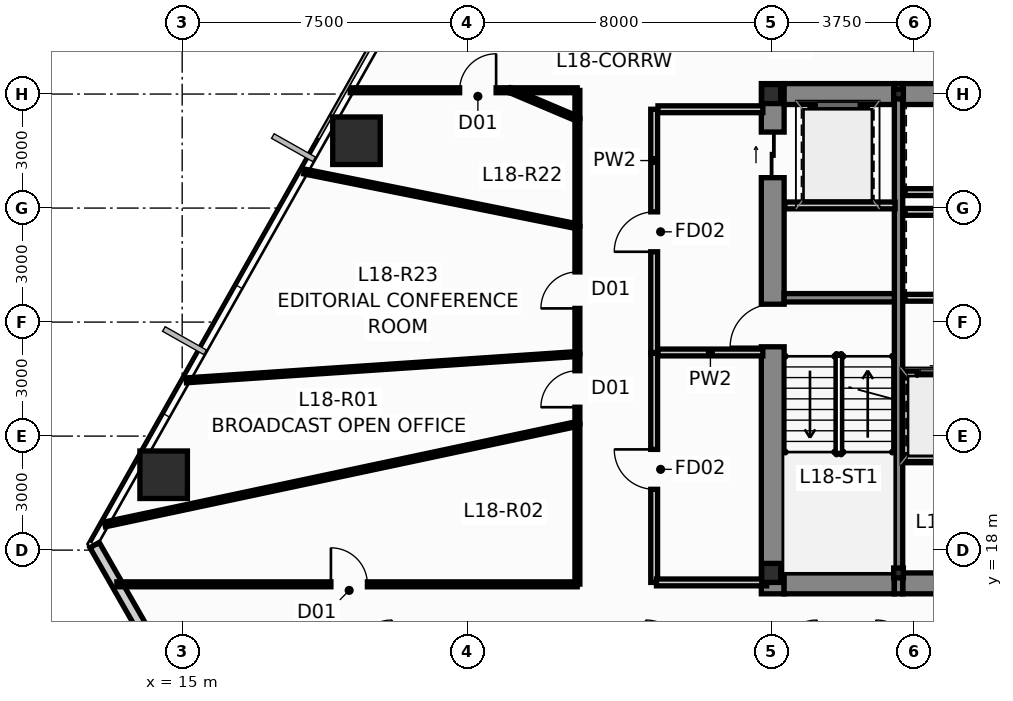
"""IFC4 building model, lengths in metres.
Left out: names, types, materials, properties, quantities, classifications, styles, units other than length and angle.
Written with IfcOpenShell. Run it as: python <this file> out.ifc"""

import sys

from ifc_helpers import new_model, si_unit, direction, frame, frame_2d, origin, origin_2d, place, context, subcontext, project, spatial, rectangle, hollow_rectangle, i_section, extrude, source, transform, mapped, element, fill, save


model = new_model("IFC4")
c1 = context("Model", 3, precision=1e-05, world=origin(), true_north=direction((0.0, 1.0)))
c2 = subcontext(c1, "Body", "Model", "MODEL_VIEW")
j1 = project(units=[si_unit("LENGTHUNIT", "METRE"), si_unit("PLANEANGLEUNIT", "RADIAN")], contexts=[c1])
p1 = place(None, origin())
s1 = spatial("IfcSite", under=j1, at=p1, CompositionType="ELEMENT")
p2 = place(p1, origin())
s2 = spatial("IfcBuilding", under=s1, at=p2, CompositionType="ELEMENT")
p3 = place(p2, frame((0.0, 0.0, 71.4)))
s3 = spatial("IfcBuildingStorey", under=s2, at=p3, CompositionType="ELEMENT", Elevation=71.4)
m1 = source(origin(), c2, "Body", "SweptSolid", [
    extrude(i_section(OverallWidth=0.5, OverallDepth=0.5, WebThickness=0.028, FlangeThickness=0.04, at=origin_2d()), origin(), (0.0, 0.0, 1.0), 3.65),
])
for number, where, z_axis, x_axis in (
    (1, (30.5, 17.4, 0.0), (0.0, 0.0, 1.0), (1.0, 0.0, 0.0)),
    (2, (30.5, 30.0, 0.0), (0.0, 0.0, 1.0), (1.0, 0.0, 0.0)),
):
    element("IfcColumn", number, at=place(p3, frame(where, z_axis=z_axis, x_axis=x_axis)), inside=s3, PredefinedType="COLUMN", context=c2, shape_type="MappedRepresentation", body=[
        mapped(m1, transform((0.0, 0.0, 0.0), scale=1.0)),
    ])
m2 = source(origin(), c2, "Body", "SweptSolid", [
    extrude(i_section(OverallWidth=0.256, OverallDepth=0.26, WebThickness=0.01, FlangeThickness=0.017, at=origin_2d()), origin(), (0.0, 0.0, 1.0), 3.65),
])
for number, where, z_axis, x_axis in (
    (3, (33.85, 17.4, 0.0), (0.0, 0.0, 1.0), (1.0, 0.0, 0.0)),
    (4, (33.85, 30.0, 0.0), (0.0, 0.0, 1.0), (1.0, 0.0, 0.0)),
):
    element("IfcColumn", number, at=place(p3, frame(where, z_axis=z_axis, x_axis=x_axis)), inside=s3, PredefinedType="COLUMN", context=c2, shape_type="MappedRepresentation", body=[
        mapped(m2, transform((0.0, 0.0, 0.0), scale=1.0)),
    ])
p4 = place(p3, frame((30.54, 16.85, 0.0), z_axis=(0.0, 0.0, 1.0), x_axis=(0.0, 1.0, 0.0)))
e5 = element("IfcWall", 5, at=p4, inside=s3, PredefinedType="SHEAR", context=c2, shape_type="SweptSolid", body=[
    extrude(rectangle(XDim=13.425, YDim=0.6, at=frame_2d((6.712, 0.0))), origin(), (0.0, 0.0, 1.0), 3.65),
])
p5 = place(p4, frame((6.5, 0.0, 0.0)))
e6 = element("IfcOpeningElement", 6, at=p5, cuts=e5, PredefinedType="OPENING", context=c2, shape_type="SweptSolid", body=[
    extrude(rectangle(XDim=1.12, YDim=2.15, at=frame_2d((0.56, 1.075))), frame((0.0, 0.312, 0.0), z_axis=(0.0, -1.0, 0.0), x_axis=(1.0, 0.0, 0.0)), (0.0, 0.0, 1.0), 0.624),
])
p6 = place(p4, frame((10.95, 0.0, 0.0)))
e7 = element("IfcOpeningElement", 7, at=p6, cuts=e5, PredefinedType="OPENING", context=c2, shape_type="SweptSolid", body=[
    extrude(rectangle(XDim=1.2, YDim=2.2, at=frame_2d((0.6, 1.1))), frame((0.0, 0.312, 0.0), z_axis=(0.0, -1.0, 0.0), x_axis=(1.0, 0.0, 0.0)), (0.0, 0.0, 1.0), 0.624),
])
p7 = place(p3, frame((30.84, 17.125, 0.0), z_axis=(0.0, 0.0, 1.0), x_axis=(1.0, 0.0, 0.0)))
e8 = element("IfcWall", 8, at=p7, inside=s3, PredefinedType="SHEAR", context=c2, shape_type="SweptSolid", body=[
    extrude(rectangle(XDim=2.9, YDim=0.55, at=frame_2d((1.45, 0.0))), origin(), (0.0, 0.0, 1.0), 3.65),
])
p8 = place(p3, frame((33.96, 17.125, 0.0), z_axis=(0.0, 0.0, 1.0), x_axis=(1.0, 0.0, 0.0)))
e9 = element("IfcWall", 9, at=p8, inside=s3, PredefinedType="SHEAR", context=c2, shape_type="SweptSolid", body=[
    extrude(rectangle(XDim=8.08, YDim=0.55, at=frame_2d((4.04, 0.0))), origin(), (0.0, 0.0, 1.0), 3.65),
])
p9 = place(p3, frame((30.84, 30.0, 0.0), z_axis=(0.0, 0.0, 1.0), x_axis=(1.0, 0.0, 0.0)))
e10 = element("IfcWall", 10, at=p9, inside=s3, PredefinedType="SHEAR", context=c2, shape_type="SweptSolid", body=[
    extrude(rectangle(XDim=2.9, YDim=0.55, at=frame_2d((1.45, 0.0))), origin(), (0.0, 0.0, 1.0), 3.65),
])
p10 = place(p3, frame((33.96, 30.0, 0.0), z_axis=(0.0, 0.0, 1.0), x_axis=(1.0, 0.0, 0.0)))
e11 = element("IfcWall", 11, at=p10, inside=s3, PredefinedType="SHEAR", context=c2, shape_type="SweptSolid", body=[
    extrude(rectangle(XDim=3.78, YDim=0.55, at=frame_2d((1.89, 0.0))), origin(), (0.0, 0.0, 1.0), 3.65),
])
p11 = place(p3, frame((33.85, 16.85, 0.0), z_axis=(0.0, 0.0, 1.0), x_axis=(0.0, 1.0, 0.0)))
e12 = element("IfcWall", 12, at=p11, inside=s3, PredefinedType="SHEAR", context=c2, shape_type="SweptSolid", body=[
    extrude(rectangle(XDim=13.425, YDim=0.22, at=frame_2d((6.712, 0.0))), origin(), (0.0, 0.0, 1.0), 3.65),
])
p12 = place(p3, frame((30.84, 24.64, 0.0), z_axis=(0.0, 0.0, 1.0), x_axis=(1.0, 0.0, 0.0)))
e13 = element("IfcWall", 13, at=p12, inside=s3, PredefinedType="SHEAR", context=c2, shape_type="SweptSolid", body=[
    extrude(rectangle(XDim=2.9, YDim=0.22, at=frame_2d((1.45, 0.0))), origin(), (0.0, 0.0, 1.0), 3.65),
])
m3 = source(origin(), c2, "Body", "SweptSolid", [
    extrude(hollow_rectangle(XDim=1.25, YDim=1.25, WallThickness=0.07, at=origin_2d()), origin(), (0.0, 0.0, 1.0), 3.651),
])
p13 = place(p3, frame((19.587, 28.772, 0.0), z_axis=(0.014912316331, -0.013775502979, 0.999793907933), x_axis=(0.678553674548, 0.734550822447, 0.0)))
e14 = element("IfcColumn", 14, at=p13, inside=s3, PredefinedType="COLUMN", context=c2, shape_type="MappedRepresentation", body=[
    mapped(m3, transform((0.0, 0.0, 0.0), scale=1.0)),
])
m4 = source(origin(), c2, "Body", "SweptSolid", [
    extrude(hollow_rectangle(XDim=1.25, YDim=1.25, WallThickness=0.07, at=origin_2d()), origin(), (0.0, 0.0, 1.0), 3.651),
])
p14 = place(p3, frame((14.512, 19.983, 0.0), z_axis=(0.010431083049, -0.021597691184, 0.999712324742), x_axis=(0.900476348161, 0.434904985489, 0.0)))
e15 = element("IfcColumn", 15, at=p14, inside=s3, PredefinedType="COLUMN", context=c2, shape_type="MappedRepresentation", body=[
    mapped(m4, transform((0.0, 0.0, 0.0), scale=1.0)),
])
p15 = place(p3, frame((20.164, 5.08, 0.0), z_axis=(0.0, 0.0, 1.0), x_axis=(-0.496610912016, 0.867973272668, 0.0)))
e16 = element("IfcWall", 16, at=p15, inside=s3, PredefinedType="STANDARD", context=c2, shape_type="SweptSolid", body=[
    extrude(rectangle(XDim=15.039, YDim=0.28, at=frame_2d((7.519, 0.0))), origin(), (0.0, 0.0, 1.0), 3.25),
])
p16 = place(p15, frame((6.62, 0.0, 0.9)))
e17 = element("IfcOpeningElement", 17, at=p16, cuts=e16, PredefinedType="OPENING", context=c2, shape_type="SweptSolid", body=[
    extrude(rectangle(XDim=1.8, YDim=1.8, at=frame_2d((0.9, 0.9))), frame((0.0, 0.152, 0.0), z_axis=(0.0, -1.0, 0.0), x_axis=(1.0, 0.0, 0.0)), (0.0, 0.0, 1.0), 0.304),
])
p17 = place(p3, frame((34.02, 22.62, 0.0), z_axis=(0.0, 0.0, 1.0), x_axis=(1.0, 0.0, 0.0)))
e18 = element("IfcWall", 18, at=p17, inside=s3, PredefinedType="PARTITIONING", context=c2, shape_type="SweptSolid", body=[
    extrude(rectangle(XDim=3.6, YDim=0.18, at=frame_2d((1.8, 0.0))), origin(), (0.0, 0.0, 1.0), 3.25),
])
p18 = place(p17, frame((0.32, 0.0, 0.0)))
e19 = element("IfcOpeningElement", 19, at=p18, cuts=e18, PredefinedType="OPENING", context=c2, shape_type="SweptSolid", body=[
    extrude(rectangle(XDim=1.1, YDim=2.2, at=frame_2d((0.55, 1.1))), frame((0.0, 0.102, 0.0), z_axis=(0.0, -1.0, 0.0), x_axis=(1.0, 0.0, 0.0)), (0.0, 0.0, 1.0), 0.204),
])
p19 = place(p17, frame((2.12, 0.0, 0.0)))
e20 = element("IfcOpeningElement", 20, at=p19, cuts=e18, PredefinedType="OPENING", context=c2, shape_type="SweptSolid", body=[
    extrude(rectangle(XDim=1.1, YDim=2.2, at=frame_2d((0.55, 1.1))), frame((0.0, 0.102, 0.0), z_axis=(0.0, -1.0, 0.0), x_axis=(1.0, 0.0, 0.0)), (0.0, 0.0, 1.0), 0.204),
])
p20 = place(p3, frame((34.02, 26.9, 0.0), z_axis=(0.0, 0.0, 1.0), x_axis=(1.0, 0.0, 0.0)))
e21 = element("IfcWall", 21, at=p20, inside=s3, PredefinedType="PARTITIONING", context=c2, shape_type="SweptSolid", body=[
    extrude(rectangle(XDim=3.6, YDim=0.18, at=frame_2d((1.8, 0.0))), origin(), (0.0, 0.0, 1.0), 3.25),
])
p21 = place(p3, frame((34.02, 24.64, 0.0), z_axis=(0.0, 0.0, 1.0), x_axis=(1.0, 0.0, 0.0)))
e22 = element("IfcWall", 22, at=p21, inside=s3, PredefinedType="PARTITIONING", context=c2, shape_type="SweptSolid", body=[
    extrude(rectangle(XDim=3.68, YDim=0.18, at=frame_2d((1.84, 0.0))), origin(), (0.0, 0.0, 1.0), 3.25),
])
p22 = place(p3, frame((34.02, 27.42, 0.0), z_axis=(0.0, 0.0, 1.0), x_axis=(1.0, 0.0, 0.0)))
e23 = element("IfcWall", 23, at=p22, inside=s3, PredefinedType="PARTITIONING", context=c2, shape_type="SweptSolid", body=[
    extrude(rectangle(XDim=3.66, YDim=0.18, at=frame_2d((1.83, 0.0))), origin(), (0.0, 0.0, 1.0), 3.25),
])
p23 = place(p3, frame((27.42, 23.2, 0.0), z_axis=(0.0, 0.0, 1.0), x_axis=(0.0, 1.0, 0.0)))
e24 = element("IfcWall", 24, at=p23, inside=s3, PredefinedType="PARTITIONING", context=c2, shape_type="SweptSolid", body=[
    extrude(rectangle(XDim=6.4, YDim=0.18, at=frame_2d((3.2, 0.0))), origin(), (0.0, 0.0, 1.0), 3.25),
])
p24 = place(p23, frame((2.65, 0.0, 0.0)))
e25 = element("IfcOpeningElement", 25, at=p24, cuts=e24, PredefinedType="OPENING", context=c2, shape_type="SweptSolid", body=[
    extrude(rectangle(XDim=1.05, YDim=2.15, at=frame_2d((0.525, 1.075))), frame((0.0, 0.102, 0.0), z_axis=(0.0, -1.0, 0.0), x_axis=(1.0, 0.0, 0.0)), (0.0, 0.0, 1.0), 0.204),
])
p25 = place(p3, frame((27.52, 23.2, 0.0), z_axis=(0.0, 0.0, 1.0), x_axis=(1.0, 0.0, 0.0)))
e26 = element("IfcWall", 26, at=p25, inside=s3, PredefinedType="PARTITIONING", context=c2, shape_type="SweptSolid", body=[
    extrude(rectangle(XDim=2.76, YDim=0.18, at=frame_2d((1.38, 0.0))), origin(), (0.0, 0.0, 1.0), 3.25),
])
p26 = place(p3, frame((27.52, 29.6, 0.0), z_axis=(0.0, 0.0, 1.0), x_axis=(1.0, 0.0, 0.0)))
e27 = element("IfcWall", 27, at=p26, inside=s3, PredefinedType="PARTITIONING", context=c2, shape_type="SweptSolid", body=[
    extrude(rectangle(XDim=2.76, YDim=0.18, at=frame_2d((1.38, 0.0))), origin(), (0.0, 0.0, 1.0), 2.633),
])
p27 = place(p3, frame((30.86, 27.07, 0.0), z_axis=(0.0, 0.0, 1.0), x_axis=(1.0, 0.0, 0.0)))
e28 = element("IfcWall", 28, at=p27, inside=s3, PredefinedType="PARTITIONING", context=c2, shape_type="SweptSolid", body=[
    extrude(rectangle(XDim=2.9, YDim=0.18, at=frame_2d((1.45, 0.0))), origin(), (0.0, 0.0, 1.0), 3.25),
])
p28 = place(p3, frame((34.02, 20.42, 0.0), z_axis=(0.0, 0.0, 1.0), x_axis=(1.0, 0.0, 0.0)))
e29 = element("IfcWall", 29, at=p28, inside=s3, PredefinedType="PARTITIONING", context=c2, shape_type="SweptSolid", body=[
    extrude(rectangle(XDim=3.64, YDim=0.18, at=frame_2d((1.82, 0.0))), origin(), (0.0, 0.0, 1.0), 3.25),
])
p29 = place(p3, frame((27.42, 17.15, 0.0), z_axis=(0.0, 0.0, 1.0), x_axis=(0.0, 1.0, 0.0)))
e30 = element("IfcWall", 30, at=p29, inside=s3, PredefinedType="PARTITIONING", context=c2, shape_type="SweptSolid", body=[
    extrude(rectangle(XDim=6.03, YDim=0.18, at=frame_2d((3.015, 0.0))), origin(), (0.0, 0.0, 1.0), 2.876),
])
p30 = place(p29, frame((2.45, 0.0, 0.0)))
e31 = element("IfcOpeningElement", 31, at=p30, cuts=e30, PredefinedType="OPENING", context=c2, shape_type="SweptSolid", body=[
    extrude(rectangle(XDim=1.05, YDim=2.15, at=frame_2d((0.525, 1.075))), frame((0.0, 0.102, 0.0), z_axis=(0.0, -1.0, 0.0), x_axis=(1.0, 0.0, 0.0)), (0.0, 0.0, 1.0), 0.204),
])
p31 = place(p3, frame((27.48, 17.15, 0.0), z_axis=(0.0, 0.0, 1.0), x_axis=(1.0, 0.0, 0.0)))
e32 = element("IfcWall", 32, at=p31, inside=s3, PredefinedType="PARTITIONING", context=c2, shape_type="SweptSolid", body=[
    extrude(rectangle(XDim=2.9, YDim=0.18, at=frame_2d((1.45, 0.0))), origin(), (0.0, 0.0, 1.0), 2.633),
])
p32 = place(p3, frame((12.967, 18.677, 0.0), z_axis=(0.0, 0.0, 1.0), x_axis=(0.978139703206, 0.207948842293, 0.0)))
e33 = element("IfcWall", 33, at=p32, inside=s3, PredefinedType="PARTITIONING", context=c2, shape_type="SweptSolid", body=[
    extrude(rectangle(XDim=12.706, YDim=0.13, at=frame_2d((6.353, 0.0))), origin(), (0.0, 0.0, 1.0), 2.633),
])
p33 = place(p3, frame((13.281, 17.1, 0.0), z_axis=(0.0, 0.0, 1.0), x_axis=(1.0, 0.0, 0.0)))
e34 = element("IfcWall", 34, at=p33, inside=s3, PredefinedType="PARTITIONING", context=c2, shape_type="SweptSolid", body=[
    extrude(rectangle(XDim=12.114, YDim=0.13, at=frame_2d((6.057, 0.0))), origin(), (0.0, 0.0, 1.0), 3.25),
])
p34 = place(p33, frame((5.633, 0.0, 0.0)))
e35 = element("IfcOpeningElement", 35, at=p34, cuts=e34, PredefinedType="OPENING", context=c2, shape_type="SweptSolid", body=[
    extrude(rectangle(XDim=0.96, YDim=2.15, at=frame_2d((0.48, 1.075))), frame((0.0, 0.077, 0.0), z_axis=(0.0, -1.0, 0.0), x_axis=(1.0, 0.0, 0.0)), (0.0, 0.0, 1.0), 0.154),
])
p35 = place(p3, frame((15.109, 22.467, 0.0), z_axis=(0.0, 0.0, 1.0), x_axis=(0.997740719381, 0.067182266178, 0.0)))
e36 = element("IfcWall", 36, at=p35, inside=s3, PredefinedType="PARTITIONING", context=c2, shape_type="SweptSolid", body=[
    extrude(rectangle(XDim=10.31, YDim=0.13, at=frame_2d((5.155, 0.0))), origin(), (0.0, 0.0, 1.0), 3.25),
])
p36 = place(p3, frame((18.213, 27.961, 0.0), z_axis=(0.0, 0.0, 1.0), x_axis=(0.980475419992, -0.196641681214, 0.0)))
e37 = element("IfcWall", 37, at=p36, inside=s3, PredefinedType="PARTITIONING", context=c2, shape_type="SweptSolid", body=[
    extrude(rectangle(XDim=7.325, YDim=0.13, at=frame_2d((3.663, 0.0))), origin(), (0.0, 0.0, 1.0), 3.25),
])
p37 = place(p3, frame((19.421, 30.1, 0.0), z_axis=(0.0, 0.0, 1.0), x_axis=(1.0, 0.0, 0.0)))
e38 = element("IfcWall", 38, at=p37, inside=s3, PredefinedType="PARTITIONING", context=c2, shape_type="SweptSolid", body=[
    extrude(rectangle(XDim=4.204, YDim=0.13, at=frame_2d((2.102, 0.0))), origin(), (0.0, 0.0, 1.0), 3.25),
])
p38 = place(p37, frame((2.88, 0.0, 0.0)))
e39 = element("IfcOpeningElement", 39, at=p38, cuts=e38, PredefinedType="OPENING", context=c2, shape_type="SweptSolid", body=[
    extrude(rectangle(XDim=0.96, YDim=2.15, at=frame_2d((0.48, 1.075))), frame((0.0, 0.077, 0.0), z_axis=(0.0, -1.0, 0.0), x_axis=(1.0, 0.0, 0.0)), (0.0, 0.0, 1.0), 0.154),
])
p39 = place(p3, frame((25.4, 17.105, 0.0), z_axis=(0.0, 0.0, 1.0), x_axis=(0.0, 1.0, 0.0)))
e40 = element("IfcWall", 40, at=p39, inside=s3, PredefinedType="PARTITIONING", context=c2, shape_type="SweptSolid", body=[
    extrude(rectangle(XDim=4.21, YDim=0.13, at=frame_2d((2.105, 0.0))), origin(), (0.0, 0.0, 1.0), 2.876),
])
p40 = place(p3, frame((25.4, 23.165, 0.0), z_axis=(0.0, 0.0, 1.0), x_axis=(0.0, 1.0, 0.0)))
e41 = element("IfcWall", 41, at=p40, inside=s3, PredefinedType="PARTITIONING", context=c2, shape_type="SweptSolid", body=[
    extrude(rectangle(XDim=3.35, YDim=0.13, at=frame_2d((1.675, 0.0))), origin(), (0.0, 0.0, 1.0), 2.876),
])
p41 = place(p40, frame((1.195, 0.0, 0.0)))
e42 = element("IfcOpeningElement", 42, at=p41, cuts=e41, PredefinedType="OPENING", context=c2, shape_type="SweptSolid", body=[
    extrude(rectangle(XDim=0.96, YDim=2.15, at=frame_2d((0.48, 1.075))), frame((0.0, 0.077, 0.0), z_axis=(0.0, -1.0, 0.0), x_axis=(1.0, 0.0, 0.0)), (0.0, 0.0, 1.0), 0.154),
])
p42 = place(p3, frame((25.4, 26.525, 0.0), z_axis=(0.0, 0.0, 1.0), x_axis=(0.0, 1.0, 0.0)))
e43 = element("IfcWall", 43, at=p42, inside=s3, PredefinedType="PARTITIONING", context=c2, shape_type="SweptSolid", body=[
    extrude(rectangle(XDim=2.82, YDim=0.13, at=frame_2d((1.41, 0.0))), origin(), (0.0, 0.0, 1.0), 2.876),
])
p43 = place(p3, frame((23.635, 30.098, 0.0), z_axis=(0.0, 0.0, 1.0), x_axis=(0.920736167048, -0.390185738706, 0.0)))
e44 = element("IfcWall", 44, at=p43, inside=s3, PredefinedType="PARTITIONING", context=c2, shape_type="SweptSolid", body=[
    extrude(rectangle(XDim=1.912, YDim=0.13, at=frame_2d((0.956, 0.0))), origin(), (0.0, 0.0, 1.0), 3.25),
])
p44 = place(p3, frame((25.4, 21.325, 0.0), z_axis=(0.0, 0.0, 1.0), x_axis=(0.0, 1.0, 0.0)))
e45 = element("IfcWall", 45, at=p44, inside=s3, PredefinedType="PARTITIONING", context=c2, shape_type="SweptSolid", body=[
    extrude(rectangle(XDim=1.83, YDim=0.13, at=frame_2d((0.915, 0.0))), origin(), (0.0, 0.0, 1.0), 2.876),
])
p45 = place(p44, frame((0.435, 0.0, 0.0)))
e46 = element("IfcOpeningElement", 46, at=p45, cuts=e45, PredefinedType="OPENING", context=c2, shape_type="SweptSolid", body=[
    extrude(rectangle(XDim=0.96, YDim=2.15, at=frame_2d((0.48, 1.075))), frame((0.0, 0.077, 0.0), z_axis=(0.0, -1.0, 0.0), x_axis=(1.0, 0.0, 0.0)), (0.0, 0.0, 1.0), 0.154),
])
p46 = place(p3, frame((25.395, 30.1, 0.0), z_axis=(0.0, 0.0, 1.0), x_axis=(-1.0, 0.0, 0.0)))
e47 = element("IfcWall", 47, at=p46, inside=s3, PredefinedType="PARTITIONING", context=c2, shape_type="SweptSolid", body=[
    extrude(rectangle(XDim=1.76, YDim=0.13, at=frame_2d((0.88, 0.0))), origin(), (0.0, 0.0, 1.0), 3.25),
])
p47 = place(p3, frame((25.4, 29.355, 0.0), z_axis=(0.0, 0.0, 1.0), x_axis=(0.0, 1.0, 0.0)))
e48 = element("IfcWall", 48, at=p47, inside=s3, PredefinedType="PARTITIONING", context=c2, shape_type="SweptSolid", body=[
    extrude(rectangle(XDim=0.74, YDim=0.13, at=frame_2d((0.37, 0.0))), origin(), (0.0, 0.0, 1.0), 3.25),
])
p48 = place(p5, origin())
e49 = element("IfcDoor", 49, at=p48, inside=s3, OperationType="SINGLE_SWING_LEFT", PredefinedType="DOOR", context=c2, shape_type="SweptSolid", body=[
    extrude(rectangle(XDim=1.12, YDim=2.15, at=frame_2d((0.56, 1.075))), frame((0.0, 0.025, 0.0), z_axis=(0.0, -1.0, 0.0), x_axis=(1.0, 0.0, 0.0)), (0.0, 0.0, 1.0), 0.05),
])
fill(e6, e49)
p49 = place(p6, origin())
e50 = element("IfcDoor", 50, at=p49, inside=s3, OperationType="SLIDING_TO_LEFT", PredefinedType="DOOR", context=c2, shape_type="SweptSolid", body=[
    extrude(rectangle(XDim=1.2, YDim=2.2, at=frame_2d((0.6, 1.1))), frame((0.0, 0.025, 0.0), z_axis=(0.0, -1.0, 0.0), x_axis=(1.0, 0.0, 0.0)), (0.0, 0.0, 1.0), 0.05),
])
fill(e7, e50)
p50 = place(p18, origin())
e51 = element("IfcDoor", 51, at=p50, inside=s3, OperationType="SLIDING_TO_LEFT", PredefinedType="DOOR", context=c2, shape_type="SweptSolid", body=[
    extrude(rectangle(XDim=1.1, YDim=2.2, at=frame_2d((0.55, 1.1))), frame((0.0, 0.025, 0.0), z_axis=(0.0, -1.0, 0.0), x_axis=(1.0, 0.0, 0.0)), (0.0, 0.0, 1.0), 0.05),
])
fill(e19, e51)
p51 = place(p24, origin())
e52 = element("IfcDoor", 52, at=p51, inside=s3, OperationType="SINGLE_SWING_LEFT", PredefinedType="DOOR", context=c2, shape_type="SweptSolid", body=[
    extrude(rectangle(XDim=1.05, YDim=2.15, at=frame_2d((0.525, 1.075))), frame((0.0, 0.025, 0.0), z_axis=(0.0, -1.0, 0.0), x_axis=(1.0, 0.0, 0.0)), (0.0, 0.0, 1.0), 0.05),
])
fill(e25, e52)
p52 = place(p30, origin())
e53 = element("IfcDoor", 53, at=p52, inside=s3, OperationType="SINGLE_SWING_RIGHT", PredefinedType="DOOR", context=c2, shape_type="SweptSolid", body=[
    extrude(rectangle(XDim=1.05, YDim=2.15, at=frame_2d((0.525, 1.075))), frame((0.0, 0.025, 0.0), z_axis=(0.0, -1.0, 0.0), x_axis=(1.0, 0.0, 0.0)), (0.0, 0.0, 1.0), 0.05),
])
fill(e31, e53)
p53 = place(p34, origin())
e54 = element("IfcDoor", 54, at=p53, inside=s3, OperationType="SINGLE_SWING_LEFT", PredefinedType="DOOR", context=c2, shape_type="SweptSolid", body=[
    extrude(rectangle(XDim=0.96, YDim=2.15, at=frame_2d((0.48, 1.075))), frame((0.0, 0.025, 0.0), z_axis=(0.0, -1.0, 0.0), x_axis=(1.0, 0.0, 0.0)), (0.0, 0.0, 1.0), 0.05),
])
fill(e35, e54)
p54 = place(p38, origin())
e55 = element("IfcDoor", 55, at=p54, inside=s3, OperationType="SINGLE_SWING_RIGHT", PredefinedType="DOOR", context=c2, shape_type="SweptSolid", body=[
    extrude(rectangle(XDim=0.96, YDim=2.15, at=frame_2d((0.48, 1.075))), frame((0.0, 0.025, 0.0), z_axis=(0.0, -1.0, 0.0), x_axis=(1.0, 0.0, 0.0)), (0.0, 0.0, 1.0), 0.05),
])
fill(e39, e55)
p55 = place(p41, origin())
e56 = element("IfcDoor", 56, at=p55, inside=s3, OperationType="SINGLE_SWING_LEFT", PredefinedType="DOOR", context=c2, shape_type="SweptSolid", body=[
    extrude(rectangle(XDim=0.96, YDim=2.15, at=frame_2d((0.48, 1.075))), frame((0.0, 0.025, 0.0), z_axis=(0.0, -1.0, 0.0), x_axis=(1.0, 0.0, 0.0)), (0.0, 0.0, 1.0), 0.05),
])
fill(e42, e56)
p56 = place(p45, origin())
e57 = element("IfcDoor", 57, at=p56, inside=s3, OperationType="SINGLE_SWING_LEFT", PredefinedType="DOOR", context=c2, shape_type="SweptSolid", body=[
    extrude(rectangle(XDim=0.96, YDim=2.15, at=frame_2d((0.48, 1.075))), frame((0.0, 0.025, 0.0), z_axis=(0.0, -1.0, 0.0), x_axis=(1.0, 0.0, 0.0)), (0.0, 0.0, 1.0), 0.05),
])
fill(e46, e57)
save(model, sys.argv[1])
